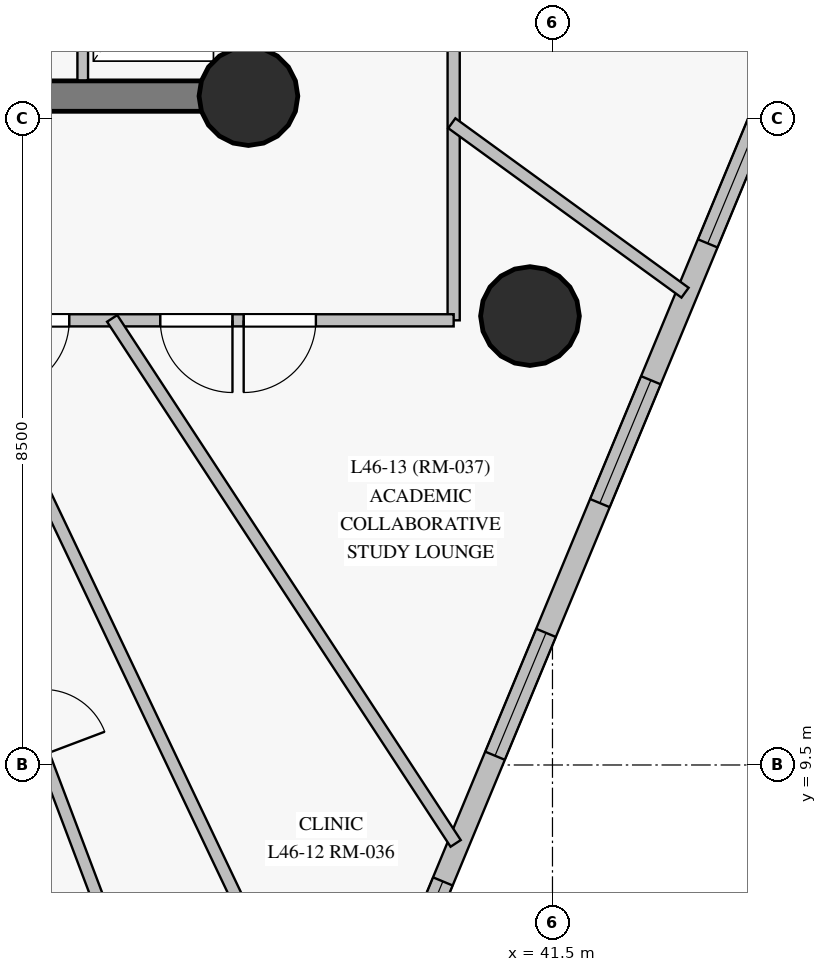
"""IFC4 building model, lengths in metres.
Left out: names, types, materials, properties, quantities, classifications, styles, units other than length and angle.
Written with IfcOpenShell. Run it as: python <this file> out.ifc"""

import sys

from ifc_helpers import new_model, si_unit, direction, frame, frame_2d, origin, origin_with_axes, origin_2d, place, context, subcontext, project, spatial, rectangle, circle, extrude, source, transform, mapped, element, fill, save


model = new_model("IFC4")
c1 = context("Model", 3, precision=1e-05, world=origin(), true_north=direction((0.0, 1.0)))
c2 = subcontext(c1, "Body", "Model", "MODEL_VIEW")
j1 = project(units=[si_unit("LENGTHUNIT", "METRE"), si_unit("PLANEANGLEUNIT", "RADIAN")], contexts=[c1])
p1 = place(None, origin())
s1 = spatial("IfcSite", under=j1, at=p1, CompositionType="ELEMENT")
p2 = place(p1, origin())
s2 = spatial("IfcBuilding", under=s1, at=p2, CompositionType="ELEMENT")
p3 = place(p2, frame((0.0, 0.0, 162.65)))
s3 = spatial("IfcBuildingStorey", under=s2, at=p3, CompositionType="ELEMENT", Elevation=162.65)
p4 = place(p3, frame((26.55, 18.3, 0.0), z_axis=(0.0, 0.0, 1.0), x_axis=(1.0, 0.0, 0.0)))
e1 = element("IfcWall", 1, at=p4, inside=s3, PredefinedType="SHEAR", context=c2, shape_type="SweptSolid", body=[
    extrude(rectangle(XDim=10.95, YDim=0.4, at=frame_2d((5.475, 0.0))), origin(), (0.0, 0.0, 1.0), 2.825),
])
p5 = place(p4, frame((4.55, 0.0, 0.0)))
e2 = element("IfcOpeningElement", 2, at=p5, cuts=e1, PredefinedType="OPENING", context=c2, shape_type="SweptSolid", body=[
    extrude(rectangle(XDim=1.4, YDim=2.2, at=frame_2d((0.7, 1.1))), frame((0.0, 0.21, 0.0), z_axis=(0.0, -1.0, 0.0), x_axis=(1.0, 0.0, 0.0)), (0.0, 0.0, 1.0), 0.42),
])
p6 = place(p3, frame((37.5, 18.3, 0.0), z_axis=(0.0, 0.0, 1.0), x_axis=(0.0, 1.0, 0.0)))
e3 = element("IfcWall", 3, at=p6, inside=s3, PredefinedType="SHEAR", context=c2, shape_type="SweptSolid", body=[
    extrude(rectangle(XDim=16.4, YDim=0.4, at=frame_2d((8.2, 0.0))), origin(), (0.0, 0.0, 1.0), 2.825),
])
p7 = place(p6, frame((14.15, 0.0, 0.0)))
e4 = element("IfcOpeningElement", 4, at=p7, cuts=e3, PredefinedType="OPENING", context=c2, shape_type="SweptSolid", body=[
    extrude(rectangle(XDim=1.2, YDim=2.15, at=frame_2d((0.6, 1.075))), frame((0.0, 0.21, 0.0), z_axis=(0.0, -1.0, 0.0), x_axis=(1.0, 0.0, 0.0)), (0.0, 0.0, 1.0), 0.42),
])
m1 = source(origin_with_axes(), c2, "Body", "SweptSolid", [
    extrude(circle(Radius=0.65, at=origin_2d()), origin(), (0.0, 0.0, 1.0), 3.05),
])
for number, where, z_axis, x_axis in (
    (5, (37.5, 18.3, 0.0), (0.0, 0.0, 1.0), (1.0, 0.0, 0.0)),
    (6, (41.204, 15.406, 0.0), (0.0, 0.0, 1.0), (1.0, 0.0, 0.0)),
):
    element("IfcColumn", number, at=place(p3, frame(where, z_axis=z_axis, x_axis=x_axis)), inside=s3, PredefinedType="COLUMN", context=c2, shape_type="MappedRepresentation", body=[
        mapped(m1, transform((0.0, 0.0, 0.0), scale=1.0)),
    ])
p8 = place(p3, frame((39.155, 5.792, 0.0), z_axis=(0.0, 0.0, 1.0), x_axis=(0.383396812416, 0.92358371804, 0.0)))
e7 = element("IfcWall", 7, at=p8, inside=s3, PredefinedType="SOLIDWALL", context=c2, shape_type="SweptSolid", body=[
    extrude(rectangle(XDim=13.959, YDim=0.28, at=frame_2d((6.98, 0.0))), origin(), (0.0, 0.0, 1.0), 2.825),
])
p9 = place(p8, frame((0.606, 0.0, 0.85)))
e8 = element("IfcOpeningElement", 8, at=p9, cuts=e7, PredefinedType="OPENING", context=c2, shape_type="SweptSolid", body=[
    extrude(rectangle(XDim=1.75, YDim=1.65, at=frame_2d((0.875, 0.825))), frame((0.0, 0.15, 0.0), z_axis=(0.0, -1.0, 0.0), x_axis=(1.0, 0.0, 0.0)), (0.0, 0.0, 1.0), 0.3),
])
p10 = place(p8, frame((4.146, 0.0, 0.85)))
e9 = element("IfcOpeningElement", 9, at=p10, cuts=e7, PredefinedType="OPENING", context=c2, shape_type="SweptSolid", body=[
    extrude(rectangle(XDim=1.75, YDim=1.65, at=frame_2d((0.875, 0.825))), frame((0.0, 0.15, 0.0), z_axis=(0.0, -1.0, 0.0), x_axis=(1.0, 0.0, 0.0)), (0.0, 0.0, 1.0), 0.3),
])
p11 = place(p8, frame((7.745, 0.0, 0.85)))
e10 = element("IfcOpeningElement", 10, at=p11, cuts=e7, PredefinedType="OPENING", context=c2, shape_type="SweptSolid", body=[
    extrude(rectangle(XDim=1.75, YDim=1.65, at=frame_2d((0.875, 0.825))), frame((0.0, 0.15, 0.0), z_axis=(0.0, -1.0, 0.0), x_axis=(1.0, 0.0, 0.0)), (0.0, 0.0, 1.0), 0.3),
])
p12 = place(p8, frame((11.444, 0.0, 0.85)))
e11 = element("IfcOpeningElement", 11, at=p12, cuts=e7, PredefinedType="OPENING", context=c2, shape_type="SweptSolid", body=[
    extrude(rectangle(XDim=1.75, YDim=1.65, at=frame_2d((0.875, 0.825))), frame((0.0, 0.15, 0.0), z_axis=(0.0, -1.0, 0.0), x_axis=(1.0, 0.0, 0.0)), (0.0, 0.0, 1.0), 0.3),
])
p13 = place(p3, frame((40.2, 37.65, 0.0), z_axis=(0.0, 0.0, 1.0), x_axis=(0.0, -1.0, 0.0)))
e12 = element("IfcWall", 12, at=p13, inside=s3, PredefinedType="PARTITIONING", context=c2, shape_type="SweptSolid", body=[
    extrude(rectangle(XDim=22.3, YDim=0.16, at=frame_2d((11.15, 0.0))), origin(), (0.0, 0.0, 1.0), 2.375),
])
p14 = place(p13, frame((14.02, 0.0, 0.0)))
e13 = element("IfcOpeningElement", 13, at=p14, cuts=e12, PredefinedType="OPENING", context=c2, shape_type="SweptSolid", body=[
    extrude(rectangle(XDim=0.95, YDim=2.15, at=frame_2d((0.475, 1.075))), frame((0.0, 0.09, 0.0), z_axis=(0.0, -1.0, 0.0), x_axis=(1.0, 0.0, 0.0)), (0.0, 0.0, 1.0), 0.18),
])
p15 = place(p13, frame((10.675, 0.0, 0.0)))
e14 = element("IfcOpeningElement", 14, at=p15, cuts=e12, PredefinedType="OPENING", context=c2, shape_type="SweptSolid", body=[
    extrude(rectangle(XDim=0.95, YDim=2.15, at=frame_2d((0.475, 1.075))), frame((0.0, 0.09, 0.0), z_axis=(0.0, -1.0, 0.0), x_axis=(1.0, 0.0, 0.0)), (0.0, 0.0, 1.0), 0.18),
])
p16 = place(p13, frame((7.33, 0.0, 0.0)))
e15 = element("IfcOpeningElement", 15, at=p16, cuts=e12, PredefinedType="OPENING", context=c2, shape_type="SweptSolid", body=[
    extrude(rectangle(XDim=0.95, YDim=2.15, at=frame_2d((0.475, 1.075))), frame((0.0, 0.09, 0.0), z_axis=(0.0, -1.0, 0.0), x_axis=(1.0, 0.0, 0.0)), (0.0, 0.0, 1.0), 0.18),
])
p17 = place(p13, frame((2.5, 0.0, 0.0)))
e16 = element("IfcOpeningElement", 16, at=p17, cuts=e12, PredefinedType="OPENING", context=c2, shape_type="SweptSolid", body=[
    extrude(rectangle(XDim=0.95, YDim=2.15, at=frame_2d((0.475, 1.075))), frame((0.0, 0.09, 0.0), z_axis=(0.0, -1.0, 0.0), x_axis=(1.0, 0.0, 0.0)), (0.0, 0.0, 1.0), 0.18),
])
p18 = place(p3, frame((32.636, 15.378, 0.0), z_axis=(0.0, 0.0, 1.0), x_axis=(0.353270856326, -0.93552108585, 0.0)))
e17 = element("IfcWall", 17, at=p18, inside=s3, PredefinedType="PARTITIONING", context=c2, shape_type="SweptSolid", body=[
    extrude(rectangle(XDim=11.42, YDim=0.16, at=frame_2d((5.71, 0.0))), origin(), (0.0, 0.0, 1.0), 2.825),
])
p19 = place(p18, frame((5.28, 0.0, 0.0)))
e18 = element("IfcOpeningElement", 18, at=p19, cuts=e17, PredefinedType="OPENING", context=c2, shape_type="SweptSolid", body=[
    extrude(rectangle(XDim=0.86, YDim=2.04, at=frame_2d((0.43, 1.02))), frame((0.0, 0.09, 0.0), z_axis=(0.0, -1.0, 0.0), x_axis=(1.0, 0.0, 0.0)), (0.0, 0.0, 1.0), 0.18),
])
p20 = place(p3, frame((33.722, 15.377, 0.0), z_axis=(0.0, 0.0, 1.0), x_axis=(0.429403808609, -0.903112600483, 0.0)))
e19 = element("IfcWall", 19, at=p20, inside=s3, PredefinedType="PARTITIONING", context=c2, shape_type="SweptSolid", body=[
    extrude(rectangle(XDim=10.949, YDim=0.16, at=frame_2d((5.475, 0.0))), origin(), (0.0, 0.0, 1.0), 2.825),
])
p21 = place(p3, frame((40.2, 15.35, 0.0), z_axis=(0.0, 0.0, 1.0), x_axis=(-1.0, 0.0, 0.0)))
e20 = element("IfcWall", 20, at=p21, inside=s3, PredefinedType="PARTITIONING", context=c2, shape_type="SweptSolid", body=[
    extrude(rectangle(XDim=10.65, YDim=0.16, at=frame_2d((5.325, 0.0))), origin(), (0.0, 0.0, 1.0), 2.275),
])
p22 = place(p21, frame((7.802, 0.0, 0.0)))
e21 = element("IfcOpeningElement", 21, at=p22, cuts=e20, PredefinedType="OPENING", context=c2, shape_type="SweptSolid", body=[
    extrude(rectangle(XDim=0.95, YDim=2.15, at=frame_2d((0.475, 1.075))), frame((0.0, 0.09, 0.0), z_axis=(0.0, -1.0, 0.0), x_axis=(1.0, 0.0, 0.0)), (0.0, 0.0, 1.0), 0.18),
])
p23 = place(p21, frame((5.058, 0.0, 0.0)))
e22 = element("IfcOpeningElement", 22, at=p23, cuts=e20, PredefinedType="OPENING", context=c2, shape_type="SweptSolid", body=[
    extrude(rectangle(XDim=0.95, YDim=2.15, at=frame_2d((0.475, 1.075))), frame((0.0, 0.09, 0.0), z_axis=(0.0, -1.0, 0.0), x_axis=(1.0, 0.0, 0.0)), (0.0, 0.0, 1.0), 0.18),
])
p24 = place(p21, frame((2.91, 0.0, 0.0)))
e23 = element("IfcOpeningElement", 23, at=p24, cuts=e20, PredefinedType="OPENING", context=c2, shape_type="SweptSolid", body=[
    extrude(rectangle(XDim=0.95, YDim=2.15, at=frame_2d((0.475, 1.075))), frame((0.0, 0.09, 0.0), z_axis=(0.0, -1.0, 0.0), x_axis=(1.0, 0.0, 0.0)), (0.0, 0.0, 1.0), 0.18),
])
p25 = place(p21, frame((1.812, 0.0, 0.0)))
e24 = element("IfcOpeningElement", 24, at=p25, cuts=e20, PredefinedType="OPENING", context=c2, shape_type="SweptSolid", body=[
    extrude(rectangle(XDim=0.95, YDim=2.15, at=frame_2d((0.475, 1.075))), frame((0.0, 0.09, 0.0), z_axis=(0.0, -1.0, 0.0), x_axis=(1.0, 0.0, 0.0)), (0.0, 0.0, 1.0), 0.18),
])
p26 = place(p3, frame((35.707, 15.375, 0.0), z_axis=(0.0, 0.0, 1.0), x_axis=(0.547512330947, -0.836797614397, 0.0)))
e25 = element("IfcWall", 25, at=p26, inside=s3, PredefinedType="PARTITIONING", context=c2, shape_type="SweptSolid", body=[
    extrude(rectangle(XDim=8.254, YDim=0.16, at=frame_2d((4.127, 0.0))), origin(), (0.0, 0.0, 1.0), 2.825),
])
p27 = place(p3, frame((40.176, 17.943, 0.0), z_axis=(0.0, 0.0, 1.0), x_axis=(0.809022702955, -0.587777395026, 0.0)))
e26 = element("IfcWall", 26, at=p27, inside=s3, PredefinedType="PARTITIONING", context=c2, shape_type="SweptSolid", body=[
    extrude(rectangle(XDim=3.793, YDim=0.16, at=frame_2d((1.896, 0.0))), origin(), (0.0, 0.0, 1.0), 2.825),
])
p28 = place(p3, frame((35.32, 18.507, 0.0), z_axis=(0.0, 0.0, 1.0), x_axis=(0.0, 1.0, 0.0)))
e27 = element("IfcWall", 27, at=p28, inside=s3, PredefinedType="PARTITIONING", context=c2, shape_type="SweptSolid", body=[
    extrude(rectangle(XDim=2.604, YDim=0.14, at=frame_2d((1.302, 0.0))), origin(), (0.0, 0.0, 1.0), 2.825),
])
m2 = source(origin_with_axes(), c2, "Body", "SweptSolid", [
    extrude(rectangle(XDim=1.75, YDim=1.65, at=frame_2d((0.875, 0.825))), frame((0.0, 0.03, 0.0), z_axis=(0.0, -1.0, 0.0), x_axis=(1.0, 0.0, 0.0)), (0.0, 0.0, 1.0), 0.06),
])
p29 = place(p9, origin())
e28 = element("IfcWindow", 28, at=p29, inside=s3, PartitioningType="SINGLE_PANEL", PredefinedType="WINDOW", context=c2, shape_type="MappedRepresentation", body=[
    mapped(m2, transform((0.0, 0.0, 0.0), scale=1.0)),
])
fill(e8, e28)
p30 = place(p10, origin())
e29 = element("IfcWindow", 29, at=p30, inside=s3, PartitioningType="SINGLE_PANEL", PredefinedType="WINDOW", context=c2, shape_type="MappedRepresentation", body=[
    mapped(m2, transform((0.0, 0.0, 0.0), scale=1.0)),
])
fill(e9, e29)
p31 = place(p11, origin())
e30 = element("IfcWindow", 30, at=p31, inside=s3, PartitioningType="SINGLE_PANEL", PredefinedType="WINDOW", context=c2, shape_type="MappedRepresentation", body=[
    mapped(m2, transform((0.0, 0.0, 0.0), scale=1.0)),
])
fill(e10, e30)
p32 = place(p12, origin())
e31 = element("IfcWindow", 31, at=p32, inside=s3, PartitioningType="SINGLE_PANEL", PredefinedType="WINDOW", context=c2, shape_type="MappedRepresentation", body=[
    mapped(m2, transform((0.0, 0.0, 0.0), scale=1.0)),
])
fill(e11, e31)
m3 = source(origin_with_axes(), c2, "Body", "SweptSolid", [
    extrude(rectangle(XDim=0.95, YDim=2.15, at=frame_2d((0.475, 1.075))), frame((0.0, 0.025, 0.0), z_axis=(0.0, -1.0, 0.0), x_axis=(1.0, 0.0, 0.0)), (0.0, 0.0, 1.0), 0.05),
])
p33 = place(p23, origin())
e32 = element("IfcDoor", 32, at=p33, inside=s3, OperationType="SINGLE_SWING_RIGHT", PredefinedType="DOOR", context=c2, shape_type="MappedRepresentation", body=[
    mapped(m3, transform((0.0, 0.0, 0.0), scale=1.0)),
])
fill(e22, e32)
p34 = place(p24, origin())
e33 = element("IfcDoor", 33, at=p34, inside=s3, OperationType="SINGLE_SWING_LEFT", PredefinedType="DOOR", context=c2, shape_type="MappedRepresentation", body=[
    mapped(m3, transform((0.0, 0.0, 0.0), scale=1.0)),
])
fill(e23, e33)
p35 = place(p25, origin())
e34 = element("IfcDoor", 34, at=p35, inside=s3, OperationType="SINGLE_SWING_RIGHT", PredefinedType="DOOR", context=c2, shape_type="MappedRepresentation", body=[
    mapped(m3, transform((0.0, 0.0, 0.0), scale=1.0)),
])
fill(e24, e34)
save(model, sys.argv[1])
